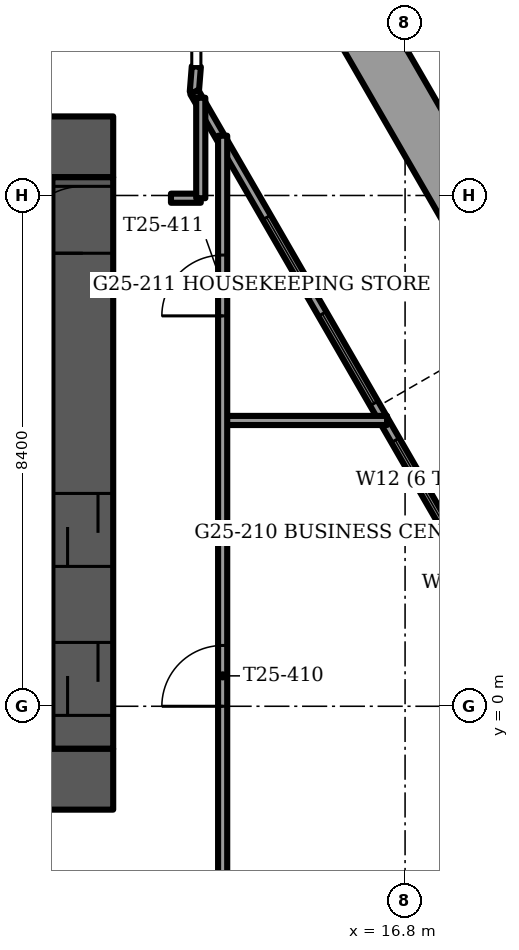
"""IFC4 building model, lengths in metres.
Left out: names, types, materials, properties, quantities, classifications, styles, units other than length and angle.
Written with IfcOpenShell. Run it as: python <this file> out.ifc"""

import sys

from ifc_helpers import new_model, si_unit, direction, frame, frame_2d, origin, place, context, subcontext, project, spatial, rectangle, extrude, element, fill, save


model = new_model("IFC4")
c1 = context("Model", 3, precision=1e-05, world=origin(), true_north=direction((0.0, 1.0)))
c2 = subcontext(c1, "Body", "Model", "MODEL_VIEW")
j1 = project(units=[si_unit("LENGTHUNIT", "METRE"), si_unit("PLANEANGLEUNIT", "RADIAN")], contexts=[c1])
p1 = place(None, origin())
s1 = spatial("IfcSite", under=j1, at=p1, CompositionType="ELEMENT")
p2 = place(p1, origin())
s2 = spatial("IfcBuilding", under=s1, at=p2, CompositionType="ELEMENT")
p3 = place(p2, frame((0.0, 0.0, 100.5)))
s3 = spatial("IfcBuildingStorey", under=s2, at=p3, CompositionType="ELEMENT", Elevation=100.5)
p4 = place(p3, frame((-12.0, -1.2, -0.3), z_axis=(0.0, 0.0, 1.0), x_axis=(1.0, 0.0, 0.0)))
e1 = element("IfcWall", 1, at=p4, inside=s3, PredefinedType="SHEAR", context=c2, shape_type="SweptSolid", body=[
    extrude(rectangle(XDim=24.0, YDim=1.0, at=frame_2d((12.0, 0.0))), origin(), (0.0, 0.0, 1.0), 3.75),
])
p5 = place(p4, frame((11.2, 0.0, 0.0)))
e2 = element("IfcOpeningElement", 2, at=p5, cuts=e1, PredefinedType="OPENING", context=c2, shape_type="SweptSolid", body=[
    extrude(rectangle(XDim=1.6, YDim=2.1, at=frame_2d((0.8, 1.05))), frame((0.0, 0.5, 0.0), z_axis=(0.0, -1.0, 0.0), x_axis=(1.0, 0.0, 0.0)), (0.0, 0.0, 1.0), 1.0),
])
p6 = place(p3, frame((-12.0, 9.2, -0.3), z_axis=(0.0, 0.0, 1.0), x_axis=(1.0, 0.0, 0.0)))
e3 = element("IfcWall", 3, at=p6, inside=s3, PredefinedType="SHEAR", context=c2, shape_type="SweptSolid", body=[
    extrude(rectangle(XDim=24.0, YDim=1.0, at=frame_2d((12.0, 0.0))), origin(), (0.0, 0.0, 1.0), 3.75),
])
p7 = place(p6, frame((11.2, 0.0, 0.0)))
e4 = element("IfcOpeningElement", 4, at=p7, cuts=e3, PredefinedType="OPENING", context=c2, shape_type="SweptSolid", body=[
    extrude(rectangle(XDim=1.6, YDim=2.1, at=frame_2d((0.8, 1.05))), frame((0.0, 0.5, 0.0), z_axis=(0.0, -1.0, 0.0), x_axis=(1.0, 0.0, 0.0)), (0.0, 0.0, 1.0), 1.0),
])
p8 = place(p6, frame((5.25, 0.0, 0.0)))
e5 = element("IfcOpeningElement", 5, at=p8, cuts=e3, PredefinedType="OPENING", context=c2, shape_type="SweptSolid", body=[
    extrude(rectangle(XDim=1.1, YDim=2.1, at=frame_2d((0.55, 1.05))), frame((0.0, 0.5, 0.0), z_axis=(0.0, -1.0, 0.0), x_axis=(1.0, 0.0, 0.0)), (0.0, 0.0, 1.0), 1.0),
])
p9 = place(p6, frame((17.65, 0.0, 0.0)))
e6 = element("IfcOpeningElement", 6, at=p9, cuts=e3, PredefinedType="OPENING", context=c2, shape_type="SweptSolid", body=[
    extrude(rectangle(XDim=1.1, YDim=2.1, at=frame_2d((0.55, 1.05))), frame((0.0, 0.5, 0.0), z_axis=(0.0, -1.0, 0.0), x_axis=(1.0, 0.0, 0.0)), (0.0, 0.0, 1.0), 1.0),
])
p10 = place(p3, frame((11.5, -0.7, -0.3), z_axis=(0.0, 0.0, 1.0), x_axis=(0.0, 1.0, 0.0)))
e7 = element("IfcWall", 7, at=p10, inside=s3, PredefinedType="SHEAR", context=c2, shape_type="SweptSolid", body=[
    extrude(rectangle(XDim=9.4, YDim=1.0, at=frame_2d((4.7, 0.0))), origin(), (0.0, 0.0, 1.0), 3.75),
])
p11 = place(p10, frame((8.15, 0.0, 0.0)))
e8 = element("IfcOpeningElement", 8, at=p11, cuts=e7, PredefinedType="OPENING", context=c2, shape_type="SweptSolid", body=[
    extrude(rectangle(XDim=1.1, YDim=2.1, at=frame_2d((0.55, 1.05))), frame((0.0, 0.5, 0.0), z_axis=(0.0, -1.0, 0.0), x_axis=(1.0, 0.0, 0.0)), (0.0, 0.0, 1.0), 1.0),
])
p12 = place(p10, frame((0.55, 0.0, 0.0)))
e9 = element("IfcOpeningElement", 9, at=p12, cuts=e7, PredefinedType="OPENING", context=c2, shape_type="SweptSolid", body=[
    extrude(rectangle(XDim=1.2, YDim=2.1, at=frame_2d((0.6, 1.05))), frame((0.0, 0.5, 0.0), z_axis=(0.0, -1.0, 0.0), x_axis=(1.0, 0.0, 0.0)), (0.0, 0.0, 1.0), 1.0),
])
p13 = place(p10, frame((3.0, 0.0, 0.0)))
e10 = element("IfcOpeningElement", 10, at=p13, cuts=e7, PredefinedType="OPENING", context=c2, shape_type="SweptSolid", body=[
    extrude(rectangle(XDim=1.2, YDim=2.1, at=frame_2d((0.6, 1.05))), frame((0.0, 0.5, 0.0), z_axis=(0.0, -1.0, 0.0), x_axis=(1.0, 0.0, 0.0)), (0.0, 0.0, 1.0), 1.0),
])
p14 = place(p3, frame((18.575, 6.872, 0.0), z_axis=(0.0, 0.0, 1.0), x_axis=(-0.499999023957, 0.866025967302, 0.0)))
e11 = element("IfcWall", 11, at=p14, inside=s3, PredefinedType="PARAPET", context=c2, shape_type="SweptSolid", body=[
    extrude(rectangle(XDim=6.673, YDim=0.9, at=frame_2d((3.337, 0.0))), origin(), (0.0, 0.0, 1.0), 1.1),
])
p15 = place(p3, frame((13.334, -10.755, 0.0), z_axis=(0.0, 0.0, 1.0), x_axis=(0.499999897272, 0.866025463095, 0.0)))
e12 = element("IfcWall", 12, at=p15, inside=s3, PredefinedType="SOLIDWALL", context=c2, shape_type="SweptSolid", body=[
    extrude(rectangle(XDim=11.426, YDim=0.15, at=frame_2d((5.713, 0.0))), origin(), (0.0, 0.0, 1.0), 3.45),
])
p16 = place(p15, frame((0.847, 0.0, 0.15)))
e13 = element("IfcOpeningElement", 13, at=p16, cuts=e12, PredefinedType="OPENING", context=c2, shape_type="SweptSolid", body=[
    extrude(rectangle(XDim=1.7, YDim=2.2, at=frame_2d((0.85, 1.1))), frame((0.0, 0.075, 0.0), z_axis=(0.0, -1.0, 0.0), x_axis=(1.0, 0.0, 0.0)), (0.0, 0.0, 1.0), 0.15),
])
p17 = place(p15, frame((6.322, 0.0, 0.15)))
e14 = element("IfcOpeningElement", 14, at=p17, cuts=e12, PredefinedType="OPENING", context=c2, shape_type="SweptSolid", body=[
    extrude(rectangle(XDim=1.5, YDim=2.2, at=frame_2d((0.75, 1.1))), frame((0.0, 0.075, 0.0), z_axis=(0.0, -1.0, 0.0), x_axis=(1.0, 0.0, 0.0)), (0.0, 0.0, 1.0), 0.15),
])
p18 = place(p3, frame((19.047, 0.205, 0.0), z_axis=(0.0, 0.0, 1.0), x_axis=(-0.499990645009, 0.866030804823, 0.0)))
e15 = element("IfcWall", 15, at=p18, inside=s3, PredefinedType="SOLIDWALL", context=c2, shape_type="SweptSolid", body=[
    extrude(rectangle(XDim=11.426, YDim=0.15, at=frame_2d((5.713, 0.0))), origin(), (0.0, 0.0, 1.0), 3.45),
])
p19 = place(p18, frame((1.246, 0.0, 0.15)))
e16 = element("IfcOpeningElement", 16, at=p19, cuts=e15, PredefinedType="OPENING", context=c2, shape_type="SweptSolid", body=[
    extrude(rectangle(XDim=1.7, YDim=2.2, at=frame_2d((0.85, 1.1))), frame((0.0, 0.075, 0.0), z_axis=(0.0, -1.0, 0.0), x_axis=(1.0, 0.0, 0.0)), (0.0, 0.0, 1.0), 0.15),
])
p20 = place(p18, frame((3.314, 0.0, 0.15)))
e17 = element("IfcOpeningElement", 17, at=p20, cuts=e15, PredefinedType="OPENING", context=c2, shape_type="SweptSolid", body=[
    extrude(rectangle(XDim=1.5, YDim=2.2, at=frame_2d((0.75, 1.1))), frame((0.0, 0.075, 0.0), z_axis=(0.0, -1.0, 0.0), x_axis=(1.0, 0.0, 0.0)), (0.0, 0.0, 1.0), 0.15),
])
p21 = place(p18, frame((5.514, 0.0, 0.15)))
e18 = element("IfcOpeningElement", 18, at=p21, cuts=e15, PredefinedType="OPENING", context=c2, shape_type="SweptSolid", body=[
    extrude(rectangle(XDim=1.7, YDim=2.2, at=frame_2d((0.85, 1.1))), frame((0.0, 0.075, 0.0), z_axis=(0.0, -1.0, 0.0), x_axis=(1.0, 0.0, 0.0)), (0.0, 0.0, 1.0), 0.15),
])
p22 = place(p18, frame((7.546, 0.0, 0.15)))
e19 = element("IfcOpeningElement", 19, at=p22, cuts=e15, PredefinedType="OPENING", context=c2, shape_type="SweptSolid", body=[
    extrude(rectangle(XDim=1.5, YDim=2.2, at=frame_2d((0.75, 1.1))), frame((0.0, 0.075, 0.0), z_axis=(0.0, -1.0, 0.0), x_axis=(1.0, 0.0, 0.0)), (0.0, 0.0, 1.0), 0.15),
])
p23 = place(p3, frame((13.334, 10.1, 0.0), z_axis=(0.0, 0.0, 1.0), x_axis=(0.078869316502, 0.996884963732, 0.0)))
e20 = element("IfcWall", 20, at=p23, inside=s3, PredefinedType="SOLIDWALL", context=c2, shape_type="SweptSolid", body=[
    extrude(rectangle(XDim=0.421, YDim=0.15, at=frame_2d((0.21, 0.0))), origin(), (0.0, 0.0, 1.0), 3.45),
])
p24 = place(p3, frame((13.8, 4.7, 0.0), z_axis=(0.0, 0.0, 1.0), x_axis=(1.0, 0.0, 0.0)))
e21 = element("IfcWall", 21, at=p24, inside=s3, PredefinedType="PARTITIONING", context=c2, shape_type="SweptSolid", body=[
    extrude(rectangle(XDim=2.704, YDim=0.15, at=frame_2d((1.352, 0.0))), origin(), (0.0, 0.0, 1.0), 3.45),
])
p25 = place(p3, frame((12.95, 8.355, 0.0), z_axis=(0.0, 0.0, 1.0), x_axis=(1.0, 0.0, 0.0)))
e22 = element("IfcWall", 22, at=p25, inside=s3, PredefinedType="PARTITIONING", context=c2, shape_type="SweptSolid", body=[
    extrude(rectangle(XDim=0.49, YDim=0.15, at=frame_2d((0.245, 0.0))), origin(), (0.0, 0.0, 1.0), 3.45),
])
p26 = place(p3, frame((13.8, -3.7, 0.0), z_axis=(0.0, 0.0, 1.0), x_axis=(0.0, 1.0, 0.0)))
e23 = element("IfcWall", 23, at=p26, inside=s3, PredefinedType="PARTITIONING", context=c2, shape_type="SweptSolid", body=[
    extrude(rectangle(XDim=13.083, YDim=0.15, at=frame_2d((6.542, 0.0))), origin(), (0.0, 0.0, 1.0), 3.45),
])
p27 = place(p26, frame((3.7, 0.0, 0.0)))
e24 = element("IfcOpeningElement", 24, at=p27, cuts=e23, PredefinedType="OPENING", context=c2, shape_type="SweptSolid", body=[
    extrude(rectangle(XDim=1.0, YDim=2.1, at=frame_2d((0.5, 1.05))), frame((0.0, 0.075, 0.0), z_axis=(0.0, -1.0, 0.0), x_axis=(1.0, 0.0, 0.0)), (0.0, 0.0, 1.0), 0.15),
])
p28 = place(p26, frame((10.12, 0.0, 0.0)))
e25 = element("IfcOpeningElement", 25, at=p28, cuts=e23, PredefinedType="OPENING", context=c2, shape_type="SweptSolid", body=[
    extrude(rectangle(XDim=1.0, YDim=2.1, at=frame_2d((0.5, 1.05))), frame((0.0, 0.075, 0.0), z_axis=(0.0, -1.0, 0.0), x_axis=(1.0, 0.0, 0.0)), (0.0, 0.0, 1.0), 0.15),
])
p29 = place(p3, frame((13.44, 8.355, 0.0), z_axis=(0.0, 0.0, 1.0), x_axis=(0.0, 1.0, 0.0)))
e26 = element("IfcWall", 26, at=p29, inside=s3, PredefinedType="PARTITIONING", context=c2, shape_type="SweptSolid", body=[
    extrude(rectangle(XDim=1.652, YDim=0.15, at=frame_2d((0.826, 0.0))), origin(), (0.0, 0.0, 1.0), 3.45),
])
p30 = place(p20, origin())
e27 = element("IfcWindow", 27, at=p30, inside=s3, PartitioningType="SINGLE_PANEL", PredefinedType="WINDOW", context=c2, shape_type="SweptSolid", body=[
    extrude(rectangle(XDim=1.5, YDim=2.2, at=frame_2d((0.75, 1.1))), frame((0.0, 0.03, 0.0), z_axis=(0.0, -1.0, 0.0), x_axis=(1.0, 0.0, 0.0)), (0.0, 0.0, 1.0), 0.06),
])
fill(e17, e27)
p31 = place(p21, origin())
e28 = element("IfcWindow", 28, at=p31, inside=s3, PartitioningType="SINGLE_PANEL", PredefinedType="WINDOW", context=c2, shape_type="SweptSolid", body=[
    extrude(rectangle(XDim=1.7, YDim=2.2, at=frame_2d((0.85, 1.1))), frame((0.0, 0.03, 0.0), z_axis=(0.0, -1.0, 0.0), x_axis=(1.0, 0.0, 0.0)), (0.0, 0.0, 1.0), 0.06),
])
fill(e18, e28)
p32 = place(p22, origin())
e29 = element("IfcWindow", 29, at=p32, inside=s3, PartitioningType="SINGLE_PANEL", PredefinedType="WINDOW", context=c2, shape_type="SweptSolid", body=[
    extrude(rectangle(XDim=1.5, YDim=2.2, at=frame_2d((0.75, 1.1))), frame((0.0, 0.03, 0.0), z_axis=(0.0, -1.0, 0.0), x_axis=(1.0, 0.0, 0.0)), (0.0, 0.0, 1.0), 0.06),
])
fill(e19, e29)
p33 = place(p11, origin())
e30 = element("IfcDoor", 30, at=p33, inside=s3, OperationType="SINGLE_SWING_RIGHT", PredefinedType="DOOR", context=c2, shape_type="SweptSolid", body=[
    extrude(rectangle(XDim=1.1, YDim=2.1, at=frame_2d((0.55, 1.05))), frame((0.0, 0.025, 0.0), z_axis=(0.0, -1.0, 0.0), x_axis=(1.0, 0.0, 0.0)), (0.0, 0.0, 1.0), 0.05),
])
fill(e8, e30)
p34 = place(p12, origin())
e31 = element("IfcDoor", 31, at=p34, inside=s3, OperationType="SLIDING_TO_LEFT", PredefinedType="DOOR", context=c2, shape_type="SweptSolid", body=[
    extrude(rectangle(XDim=1.2, YDim=2.1, at=frame_2d((0.6, 1.05))), frame((0.0, 0.025, 0.0), z_axis=(0.0, -1.0, 0.0), x_axis=(1.0, 0.0, 0.0)), (0.0, 0.0, 1.0), 0.05),
])
fill(e9, e31)
p35 = place(p13, origin())
e32 = element("IfcDoor", 32, at=p35, inside=s3, OperationType="SLIDING_TO_LEFT", PredefinedType="DOOR", context=c2, shape_type="SweptSolid", body=[
    extrude(rectangle(XDim=1.2, YDim=2.1, at=frame_2d((0.6, 1.05))), frame((0.0, 0.025, 0.0), z_axis=(0.0, -1.0, 0.0), x_axis=(1.0, 0.0, 0.0)), (0.0, 0.0, 1.0), 0.05),
])
fill(e10, e32)
p36 = place(p27, origin())
e33 = element("IfcDoor", 33, at=p36, inside=s3, OperationType="SINGLE_SWING_LEFT", PredefinedType="DOOR", context=c2, shape_type="SweptSolid", body=[
    extrude(rectangle(XDim=1.0, YDim=2.1, at=frame_2d((0.5, 1.05))), frame((0.0, 0.025, 0.0), z_axis=(0.0, -1.0, 0.0), x_axis=(1.0, 0.0, 0.0)), (0.0, 0.0, 1.0), 0.05),
])
fill(e24, e33)
p37 = place(p28, origin())
e34 = element("IfcDoor", 34, at=p37, inside=s3, OperationType="SINGLE_SWING_LEFT", PredefinedType="DOOR", context=c2, shape_type="SweptSolid", body=[
    extrude(rectangle(XDim=1.0, YDim=2.1, at=frame_2d((0.5, 1.05))), frame((0.0, 0.025, 0.0), z_axis=(0.0, -1.0, 0.0), x_axis=(1.0, 0.0, 0.0)), (0.0, 0.0, 1.0), 0.05),
])
fill(e25, e34)
save(model, sys.argv[1])
